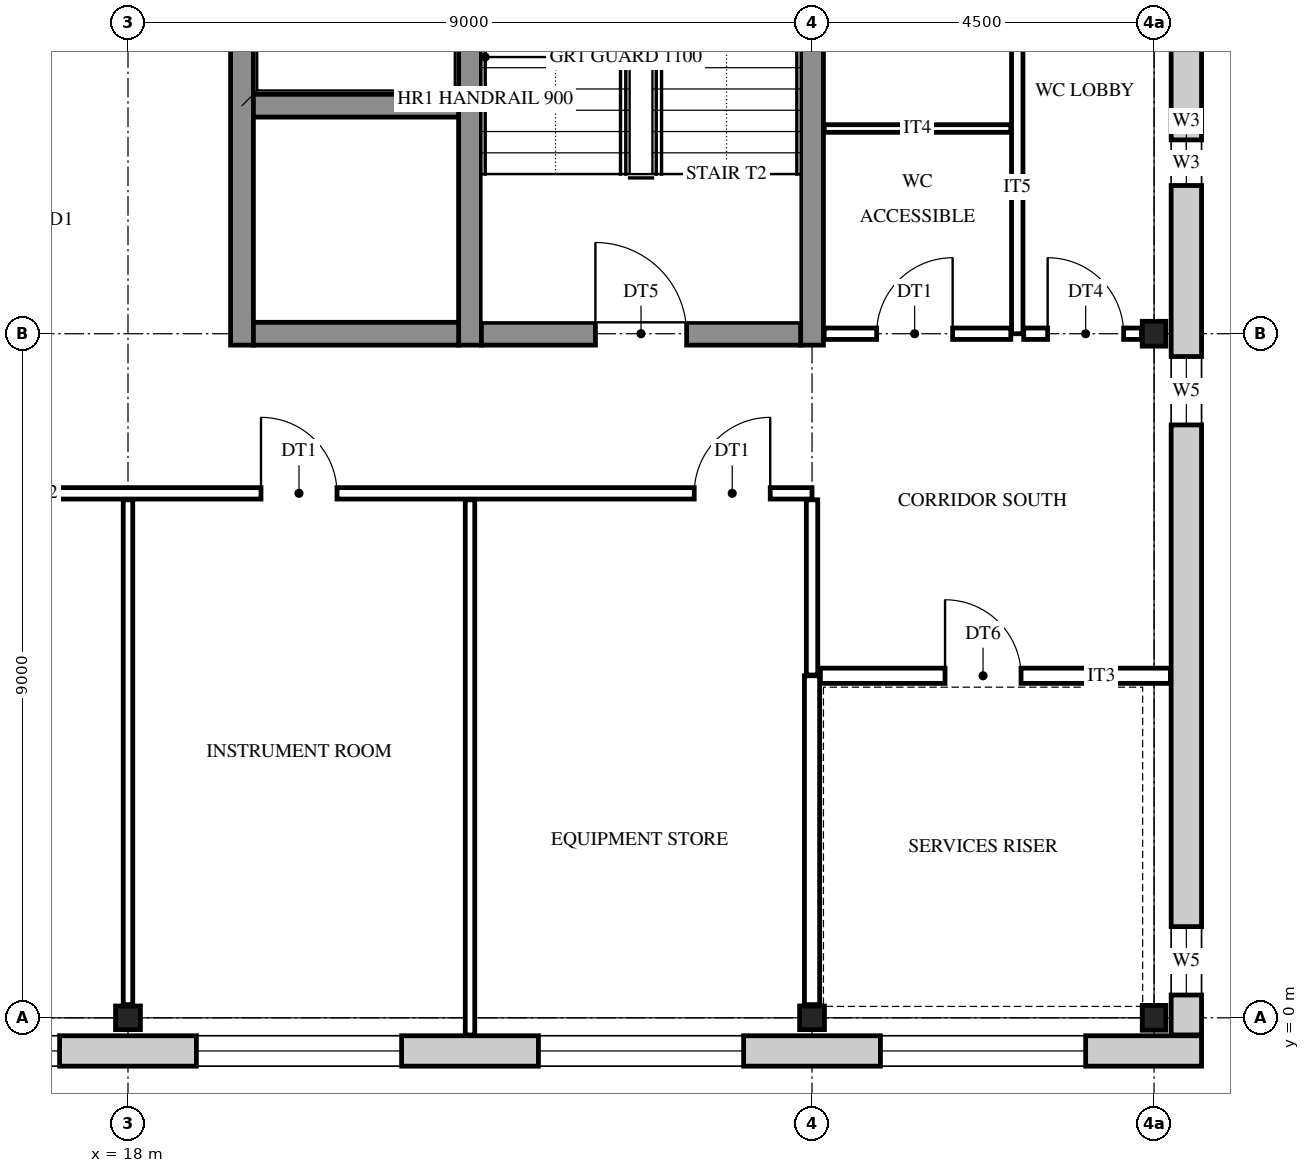
"""IFC4 building model, lengths in metres.
Left out: names, types, materials, properties, quantities, classifications, styles, units other than length and angle.
Written with IfcOpenShell. Run it as: python <this file> out.ifc"""

import sys

from ifc_helpers import new_model, si_unit, direction, frame, frame_2d, origin, origin_2d, place, context, subcontext, project, spatial, rectangle, i_section, extrude, element, fill, save


model = new_model("IFC4")
c1 = context("Model", 3, precision=1e-05, world=origin(), true_north=direction((0.0, 1.0)))
c2 = subcontext(c1, "Body", "Model", "MODEL_VIEW")
j1 = project(units=[si_unit("LENGTHUNIT", "METRE"), si_unit("PLANEANGLEUNIT", "RADIAN")], contexts=[c1])
p1 = place(None, origin())
s1 = spatial("IfcSite", under=j1, at=p1, CompositionType="ELEMENT")
p2 = place(p1, origin())
s2 = spatial("IfcBuilding", under=s1, at=p2, CompositionType="ELEMENT")
p3 = place(p2, frame((0.0, 0.0, 40.2)))
s3 = spatial("IfcBuildingStorey", under=s2, at=p3, CompositionType="ELEMENT", Elevation=40.2)
for number, where, z_axis, x_axis in (
    (1, (18.0, 0.0, 0.0), (0.0, 0.0, 1.0), (0.0, 1.0, 0.0)),
    (2, (27.0, 0.0, 0.0), (0.0, 0.0, 1.0), (0.0, 1.0, 0.0)),
    (3, (31.5, 0.0, 0.0), (0.0, 0.0, 1.0), (1.0, 0.0, 0.0)),
    (4, (31.5, 9.0, 0.0), (0.0, 0.0, 1.0), (1.0, 0.0, 0.0)),
):
    element("IfcColumn", number, at=place(p3, frame(where, z_axis=z_axis, x_axis=x_axis)), inside=s3, PredefinedType="COLUMN", context=c2, shape_type="SweptSolid", body=[
        extrude(i_section(OverallWidth=0.311, OverallDepth=0.327, WebThickness=0.016, FlangeThickness=0.025, FilletRadius=0.017, at=origin_2d()), origin(), (0.0, 0.0, 1.0), 4.2),
    ])
p4 = place(p3, frame((19.5, 8.85, 0.0), z_axis=(0.0, 0.0, 1.0), x_axis=(0.0, 1.0, 0.0)))
e5 = element("IfcWall", 5, at=p4, inside=s3, PredefinedType="SHEAR", context=c2, shape_type="SweptSolid", body=[
    extrude(rectangle(XDim=9.3, YDim=0.3, at=frame_2d((4.65, 0.0))), origin(), (0.0, 0.0, 1.0), 4.2),
])
p5 = place(p4, frame((3.95, 0.0, 0.0)))
e6 = element("IfcOpeningElement", 6, at=p5, cuts=e5, PredefinedType="OPENING", context=c2, shape_type="SweptSolid", body=[
    extrude(rectangle(XDim=1.4, YDim=2.1, at=frame_2d((0.7, 1.05))), frame((0.0, 0.16, 0.0), z_axis=(0.0, -1.0, 0.0), x_axis=(1.0, 0.0, 0.0)), (0.0, 0.0, 1.0), 0.32),
])
p6 = place(p4, frame((7.1, 0.0, 0.0)))
e7 = element("IfcOpeningElement", 7, at=p6, cuts=e5, PredefinedType="OPENING", context=c2, shape_type="SweptSolid", body=[
    extrude(rectangle(XDim=1.1, YDim=2.1, at=frame_2d((0.55, 1.05))), frame((0.0, 0.16, 0.0), z_axis=(0.0, -1.0, 0.0), x_axis=(1.0, 0.0, 0.0)), (0.0, 0.0, 1.0), 0.32),
])
for number, where, z_axis, x_axis in (
    (8, (22.5, 8.85, 0.0), (0.0, 0.0, 1.0), (0.0, 1.0, 0.0)),
    (9, (27.0, 8.85, 0.0), (0.0, 0.0, 1.0), (0.0, 1.0, 0.0)),
):
    element("IfcWall", number, at=place(p3, frame(where, z_axis=z_axis, x_axis=x_axis)), inside=s3, PredefinedType="SHEAR", context=c2, shape_type="SweptSolid", body=[
        extrude(rectangle(XDim=9.3, YDim=0.3, at=frame_2d((4.65, 0.0))), origin(), (0.0, 0.0, 1.0), 4.2),
    ])
p7 = place(p3, frame((19.65, 9.0, 0.0), z_axis=(0.0, 0.0, 1.0), x_axis=(1.0, 0.0, 0.0)))
e10 = element("IfcWall", 10, at=p7, inside=s3, PredefinedType="SHEAR", context=c2, shape_type="SweptSolid", body=[
    extrude(rectangle(XDim=2.7, YDim=0.3, at=frame_2d((1.35, 0.0))), origin(), (0.0, 0.0, 1.0), 4.2),
])
p8 = place(p3, frame((22.65, 9.0, 0.0), z_axis=(0.0, 0.0, 1.0), x_axis=(1.0, 0.0, 0.0)))
e11 = element("IfcWall", 11, at=p8, inside=s3, PredefinedType="SHEAR", context=c2, shape_type="SweptSolid", body=[
    extrude(rectangle(XDim=4.2, YDim=0.3, at=frame_2d((2.1, 0.0))), origin(), (0.0, 0.0, 1.0), 4.2),
])
p9 = place(p8, frame((1.5, 0.0, 0.0)))
e12 = element("IfcOpeningElement", 12, at=p9, cuts=e11, PredefinedType="OPENING", context=c2, shape_type="SweptSolid", body=[
    extrude(rectangle(XDim=1.2, YDim=2.1, at=frame_2d((0.6, 1.05))), frame((0.0, 0.16, 0.0), z_axis=(0.0, -1.0, 0.0), x_axis=(1.0, 0.0, 0.0)), (0.0, 0.0, 1.0), 0.32),
])
p10 = place(p3, frame((19.65, 12.0, 0.0), z_axis=(0.0, 0.0, 1.0), x_axis=(1.0, 0.0, 0.0)))
e13 = element("IfcWall", 13, at=p10, inside=s3, PredefinedType="SHEAR", context=c2, shape_type="SweptSolid", body=[
    extrude(rectangle(XDim=2.7, YDim=0.3, at=frame_2d((1.35, 0.0))), origin(), (0.0, 0.0, 1.0), 4.2),
])
p11 = place(p3, frame((32.125, -0.436, 0.0), z_axis=(0.0, 0.0, 1.0), x_axis=(-1.0, 0.0, 0.0)))
e14 = element("IfcWall", 14, at=p11, inside=s3, PredefinedType="STANDARD", context=c2, shape_type="SweptSolid", body=[
    extrude(rectangle(XDim=32.75, YDim=0.4, at=frame_2d((16.375, 0.0))), origin(), (0.0, 0.0, 1.0), 4.2),
])
p12 = place(p11, frame((28.525, 0.0, 0.9)))
e15 = element("IfcOpeningElement", 15, at=p12, cuts=e14, PredefinedType="OPENING", context=c2, shape_type="SweptSolid", body=[
    extrude(rectangle(XDim=2.7, YDim=2.5, at=frame_2d((1.35, 1.25))), frame((0.0, 0.21, 0.0), z_axis=(0.0, -1.0, 0.0), x_axis=(1.0, 0.0, 0.0)), (0.0, 0.0, 1.0), 0.42),
])
p13 = place(p11, frame((24.025, 0.0, 0.9)))
e16 = element("IfcOpeningElement", 16, at=p13, cuts=e14, PredefinedType="OPENING", context=c2, shape_type="SweptSolid", body=[
    extrude(rectangle(XDim=2.7, YDim=2.5, at=frame_2d((1.35, 1.25))), frame((0.0, 0.21, 0.0), z_axis=(0.0, -1.0, 0.0), x_axis=(1.0, 0.0, 0.0)), (0.0, 0.0, 1.0), 0.42),
])
p14 = place(p11, frame((19.525, 0.0, 0.9)))
e17 = element("IfcOpeningElement", 17, at=p14, cuts=e14, PredefinedType="OPENING", context=c2, shape_type="SweptSolid", body=[
    extrude(rectangle(XDim=2.7, YDim=2.5, at=frame_2d((1.35, 1.25))), frame((0.0, 0.21, 0.0), z_axis=(0.0, -1.0, 0.0), x_axis=(1.0, 0.0, 0.0)), (0.0, 0.0, 1.0), 0.42),
])
p15 = place(p11, frame((15.025, 0.0, 0.9)))
e18 = element("IfcOpeningElement", 18, at=p15, cuts=e14, PredefinedType="OPENING", context=c2, shape_type="SweptSolid", body=[
    extrude(rectangle(XDim=2.7, YDim=2.5, at=frame_2d((1.35, 1.25))), frame((0.0, 0.21, 0.0), z_axis=(0.0, -1.0, 0.0), x_axis=(1.0, 0.0, 0.0)), (0.0, 0.0, 1.0), 0.42),
])
p16 = place(p11, frame((10.525, 0.0, 0.9)))
e19 = element("IfcOpeningElement", 19, at=p16, cuts=e14, PredefinedType="OPENING", context=c2, shape_type="SweptSolid", body=[
    extrude(rectangle(XDim=2.7, YDim=2.5, at=frame_2d((1.35, 1.25))), frame((0.0, 0.21, 0.0), z_axis=(0.0, -1.0, 0.0), x_axis=(1.0, 0.0, 0.0)), (0.0, 0.0, 1.0), 0.42),
])
p17 = place(p11, frame((6.025, 0.0, 0.9)))
e20 = element("IfcOpeningElement", 20, at=p17, cuts=e14, PredefinedType="OPENING", context=c2, shape_type="SweptSolid", body=[
    extrude(rectangle(XDim=2.7, YDim=2.5, at=frame_2d((1.35, 1.25))), frame((0.0, 0.21, 0.0), z_axis=(0.0, -1.0, 0.0), x_axis=(1.0, 0.0, 0.0)), (0.0, 0.0, 1.0), 0.42),
])
p18 = place(p11, frame((1.525, 0.0, 0.9)))
e21 = element("IfcOpeningElement", 21, at=p18, cuts=e14, PredefinedType="OPENING", context=c2, shape_type="SweptSolid", body=[
    extrude(rectangle(XDim=2.7, YDim=2.5, at=frame_2d((1.35, 1.25))), frame((0.0, 0.21, 0.0), z_axis=(0.0, -1.0, 0.0), x_axis=(1.0, 0.0, 0.0)), (0.0, 0.0, 1.0), 0.42),
])
p19 = place(p3, frame((31.925, 27.225, 0.0), z_axis=(0.0, 0.0, 1.0), x_axis=(0.0, -1.0, 0.0)))
e22 = element("IfcWall", 22, at=p19, inside=s3, PredefinedType="STANDARD", context=c2, shape_type="SweptSolid", body=[
    extrude(rectangle(XDim=27.45, YDim=0.4, at=frame_2d((13.725, 0.0))), origin(), (0.0, 0.0, 1.0), 4.2),
])
p20 = place(p19, frame((26.025, 0.0, 0.9)))
e23 = element("IfcOpeningElement", 23, at=p20, cuts=e22, PredefinedType="OPENING", context=c2, shape_type="SweptSolid", body=[
    extrude(rectangle(XDim=0.9, YDim=2.0, at=frame_2d((0.45, 1.0))), frame((0.0, 0.21, 0.0), z_axis=(0.0, -1.0, 0.0), x_axis=(1.0, 0.0, 0.0)), (0.0, 0.0, 1.0), 0.42),
])
p21 = place(p19, frame((18.525, 0.0, 0.9)))
e24 = element("IfcOpeningElement", 24, at=p21, cuts=e22, PredefinedType="OPENING", context=c2, shape_type="SweptSolid", body=[
    extrude(rectangle(XDim=0.9, YDim=2.0, at=frame_2d((0.45, 1.0))), frame((0.0, 0.21, 0.0), z_axis=(0.0, -1.0, 0.0), x_axis=(1.0, 0.0, 0.0)), (0.0, 0.0, 1.0), 0.42),
])
p22 = place(p19, frame((15.675, 0.0, 1.6)))
e25 = element("IfcOpeningElement", 25, at=p22, cuts=e22, PredefinedType="OPENING", context=c2, shape_type="SweptSolid", body=[
    extrude(rectangle(XDim=0.6, YDim=0.9, at=frame_2d((0.3, 0.45))), frame((0.0, 0.21, 0.0), z_axis=(0.0, -1.0, 0.0), x_axis=(1.0, 0.0, 0.0)), (0.0, 0.0, 1.0), 0.42),
])
p23 = place(p19, frame((11.175, 0.0, 1.6)))
e26 = element("IfcOpeningElement", 26, at=p23, cuts=e22, PredefinedType="OPENING", context=c2, shape_type="SweptSolid", body=[
    extrude(rectangle(XDim=0.6, YDim=0.9, at=frame_2d((0.3, 0.45))), frame((0.0, 0.21, 0.0), z_axis=(0.0, -1.0, 0.0), x_axis=(1.0, 0.0, 0.0)), (0.0, 0.0, 1.0), 0.42),
])
p24 = place(p19, frame((8.025, 0.0, 0.9)))
e27 = element("IfcOpeningElement", 27, at=p24, cuts=e22, PredefinedType="OPENING", context=c2, shape_type="SweptSolid", body=[
    extrude(rectangle(XDim=0.9, YDim=2.0, at=frame_2d((0.45, 1.0))), frame((0.0, 0.21, 0.0), z_axis=(0.0, -1.0, 0.0), x_axis=(1.0, 0.0, 0.0)), (0.0, 0.0, 1.0), 0.42),
])
p25 = place(p19, frame((0.525, 0.0, 0.9)))
e28 = element("IfcOpeningElement", 28, at=p25, cuts=e22, PredefinedType="OPENING", context=c2, shape_type="SweptSolid", body=[
    extrude(rectangle(XDim=0.9, YDim=2.0, at=frame_2d((0.45, 1.0))), frame((0.0, 0.21, 0.0), z_axis=(0.0, -1.0, 0.0), x_axis=(1.0, 0.0, 0.0)), (0.0, 0.0, 1.0), 0.42),
])
p26 = place(p3, frame((18.0, 0.174, 0.0), z_axis=(0.0, 0.0, 1.0), x_axis=(0.0, 1.0, 0.0)))
e29 = element("IfcWall", 29, at=p26, inside=s3, PredefinedType="PARTITIONING", context=c2, shape_type="SweptSolid", body=[
    extrude(rectangle(XDim=6.641, YDim=0.125, at=frame_2d((3.321, 0.0))), origin(), (0.0, 0.0, 1.0), 3.537),
])
p27 = place(p3, frame((22.5, -0.226, 0.0), z_axis=(0.0, 0.0, 1.0), x_axis=(0.0, 1.0, 0.0)))
e30 = element("IfcWall", 30, at=p27, inside=s3, PredefinedType="PARTITIONING", context=c2, shape_type="SweptSolid", body=[
    extrude(rectangle(XDim=7.041, YDim=0.125, at=frame_2d((3.521, 0.0))), origin(), (0.0, 0.0, 1.0), 3.537),
])
p28 = place(p3, frame((27.0, 0.174, 0.0), z_axis=(0.0, 0.0, 1.0), x_axis=(0.0, 1.0, 0.0)))
e31 = element("IfcWall", 31, at=p28, inside=s3, PredefinedType="PARTITIONING", context=c2, shape_type="SweptSolid", body=[
    extrude(rectangle(XDim=4.326, YDim=0.2, at=frame_2d((2.163, 0.0))), origin(), (0.0, 0.0, 1.0), 3.537),
])
p29 = place(p3, frame((27.0, 4.51, 0.0), z_axis=(0.0, 0.0, 1.0), x_axis=(0.0, 1.0, 0.0)))
e32 = element("IfcWall", 32, at=p29, inside=s3, PredefinedType="PARTITIONING", context=c2, shape_type="SweptSolid", body=[
    extrude(rectangle(XDim=2.305, YDim=0.15, at=frame_2d((1.152, 0.0))), origin(), (0.0, 0.0, 1.0), 3.537),
])
p30 = place(p3, frame((29.7, 9.0, 0.0), z_axis=(0.0, 0.0, 1.0), x_axis=(0.0, 1.0, 0.0)))
e33 = element("IfcWall", 33, at=p30, inside=s3, PredefinedType="PARTITIONING", context=c2, shape_type="SweptSolid", body=[
    extrude(rectangle(XDim=6.3, YDim=0.15, at=frame_2d((3.15, 0.0))), origin(), (0.0, 0.0, 1.0), 3.537),
])
p31 = place(p30, frame((4.0, 0.0, 0.0)))
e34 = element("IfcOpeningElement", 34, at=p31, cuts=e33, PredefinedType="OPENING", context=c2, shape_type="SweptSolid", body=[
    extrude(rectangle(XDim=1.0, YDim=2.1, at=frame_2d((0.5, 1.05))), frame((0.0, 0.085, 0.0), z_axis=(0.0, -1.0, 0.0), x_axis=(1.0, 0.0, 0.0)), (0.0, 0.0, 1.0), 0.17),
])
p32 = place(p3, frame((27.11, 4.5, 0.0), z_axis=(0.0, 0.0, 1.0), x_axis=(1.0, 0.0, 0.0)))
e35 = element("IfcWall", 35, at=p32, inside=s3, PredefinedType="PARTITIONING", context=c2, shape_type="SweptSolid", body=[
    extrude(rectangle(XDim=4.605, YDim=0.2, at=frame_2d((2.302, 0.0))), origin(), (0.0, 0.0, 1.0), 3.537),
])
p33 = place(p32, frame((1.64, 0.0, 0.0)))
e36 = element("IfcOpeningElement", 36, at=p33, cuts=e35, PredefinedType="OPENING", context=c2, shape_type="SweptSolid", body=[
    extrude(rectangle(XDim=1.0, YDim=2.1, at=frame_2d((0.5, 1.05))), frame((0.0, 0.11, 0.0), z_axis=(0.0, -1.0, 0.0), x_axis=(1.0, 0.0, 0.0)), (0.0, 0.0, 1.0), 0.22),
])
p34 = place(p3, frame((6.9, 6.9, 0.0), z_axis=(0.0, 0.0, 1.0), x_axis=(1.0, 0.0, 0.0)))
e37 = element("IfcWall", 37, at=p34, inside=s3, PredefinedType="PARTITIONING", context=c2, shape_type="SweptSolid", body=[
    extrude(rectangle(XDim=20.1, YDim=0.15, at=frame_2d((10.05, 0.0))), origin(), (0.0, 0.0, 1.0), 3.537),
])
p35 = place(p34, frame((0.5, 0.0, 0.0)))
e38 = element("IfcOpeningElement", 38, at=p35, cuts=e37, PredefinedType="OPENING", context=c2, shape_type="SweptSolid", body=[
    extrude(rectangle(XDim=1.1, YDim=2.1, at=frame_2d((0.55, 1.05))), frame((0.0, 0.085, 0.0), z_axis=(0.0, -1.0, 0.0), x_axis=(1.0, 0.0, 0.0)), (0.0, 0.0, 1.0), 0.17),
])
p36 = place(p34, frame((6.05, 0.0, 0.0)))
e39 = element("IfcOpeningElement", 39, at=p36, cuts=e37, PredefinedType="OPENING", context=c2, shape_type="SweptSolid", body=[
    extrude(rectangle(XDim=1.1, YDim=2.1, at=frame_2d((0.55, 1.05))), frame((0.0, 0.085, 0.0), z_axis=(0.0, -1.0, 0.0), x_axis=(1.0, 0.0, 0.0)), (0.0, 0.0, 1.0), 0.17),
])
p37 = place(p34, frame((12.85, 0.0, 0.0)))
e40 = element("IfcOpeningElement", 40, at=p37, cuts=e37, PredefinedType="OPENING", context=c2, shape_type="SweptSolid", body=[
    extrude(rectangle(XDim=1.0, YDim=2.1, at=frame_2d((0.5, 1.05))), frame((0.0, 0.085, 0.0), z_axis=(0.0, -1.0, 0.0), x_axis=(1.0, 0.0, 0.0)), (0.0, 0.0, 1.0), 0.17),
])
p38 = place(p34, frame((18.55, 0.0, 0.0)))
e41 = element("IfcOpeningElement", 41, at=p38, cuts=e37, PredefinedType="OPENING", context=c2, shape_type="SweptSolid", body=[
    extrude(rectangle(XDim=1.0, YDim=2.1, at=frame_2d((0.5, 1.05))), frame((0.0, 0.085, 0.0), z_axis=(0.0, -1.0, 0.0), x_axis=(1.0, 0.0, 0.0)), (0.0, 0.0, 1.0), 0.17),
])
p39 = place(p3, frame((27.16, 9.0, 0.0), z_axis=(0.0, 0.0, 1.0), x_axis=(1.0, 0.0, 0.0)))
e42 = element("IfcWall", 42, at=p39, inside=s3, PredefinedType="PARTITIONING", context=c2, shape_type="SweptSolid", body=[
    extrude(rectangle(XDim=2.455, YDim=0.15, at=frame_2d((1.228, 0.0))), origin(), (0.0, 0.0, 1.0), 3.537),
])
p40 = place(p39, frame((0.69, 0.0, 0.0)))
e43 = element("IfcOpeningElement", 43, at=p40, cuts=e42, PredefinedType="OPENING", context=c2, shape_type="SweptSolid", body=[
    extrude(rectangle(XDim=1.0, YDim=2.1, at=frame_2d((0.5, 1.05))), frame((0.0, 0.085, 0.0), z_axis=(0.0, -1.0, 0.0), x_axis=(1.0, 0.0, 0.0)), (0.0, 0.0, 1.0), 0.17),
])
p41 = place(p3, frame((29.785, 9.0, 0.0), z_axis=(0.0, 0.0, 1.0), x_axis=(1.0, 0.0, 0.0)))
e44 = element("IfcWall", 44, at=p41, inside=s3, PredefinedType="PARTITIONING", context=c2, shape_type="SweptSolid", body=[
    extrude(rectangle(XDim=1.55, YDim=0.15, at=frame_2d((0.775, 0.0))), origin(), (0.0, 0.0, 1.0), 3.537),
])
p42 = place(p41, frame((0.315, 0.0, 0.0)))
e45 = element("IfcOpeningElement", 45, at=p42, cuts=e44, PredefinedType="OPENING", context=c2, shape_type="SweptSolid", body=[
    extrude(rectangle(XDim=1.0, YDim=2.1, at=frame_2d((0.5, 1.05))), frame((0.0, 0.085, 0.0), z_axis=(0.0, -1.0, 0.0), x_axis=(1.0, 0.0, 0.0)), (0.0, 0.0, 1.0), 0.17),
])
p43 = place(p3, frame((27.16, 11.7, 0.0), z_axis=(0.0, 0.0, 1.0), x_axis=(1.0, 0.0, 0.0)))
e46 = element("IfcWall", 46, at=p43, inside=s3, PredefinedType="PARTITIONING", context=c2, shape_type="SweptSolid", body=[
    extrude(rectangle(XDim=2.455, YDim=0.1, at=frame_2d((1.228, 0.0))), origin(), (0.0, 0.0, 1.0), 3.537),
])
p44 = place(p15, origin())
e47 = element("IfcWindow", 47, at=p44, inside=s3, PartitioningType="SINGLE_PANEL", PredefinedType="WINDOW", context=c2, shape_type="SweptSolid", body=[
    extrude(rectangle(XDim=2.7, YDim=2.5, at=frame_2d((1.35, 1.25))), frame((0.0, 0.03, 0.0), z_axis=(0.0, -1.0, 0.0), x_axis=(1.0, 0.0, 0.0)), (0.0, 0.0, 1.0), 0.06),
])
fill(e18, e47)
p45 = place(p16, origin())
e48 = element("IfcWindow", 48, at=p45, inside=s3, PartitioningType="SINGLE_PANEL", PredefinedType="WINDOW", context=c2, shape_type="SweptSolid", body=[
    extrude(rectangle(XDim=2.7, YDim=2.5, at=frame_2d((1.35, 1.25))), frame((0.0, 0.03, 0.0), z_axis=(0.0, -1.0, 0.0), x_axis=(1.0, 0.0, 0.0)), (0.0, 0.0, 1.0), 0.06),
])
fill(e19, e48)
p46 = place(p17, origin())
e49 = element("IfcWindow", 49, at=p46, inside=s3, PartitioningType="SINGLE_PANEL", PredefinedType="WINDOW", context=c2, shape_type="SweptSolid", body=[
    extrude(rectangle(XDim=2.7, YDim=2.5, at=frame_2d((1.35, 1.25))), frame((0.0, 0.03, 0.0), z_axis=(0.0, -1.0, 0.0), x_axis=(1.0, 0.0, 0.0)), (0.0, 0.0, 1.0), 0.06),
])
fill(e20, e49)
p47 = place(p18, origin())
e50 = element("IfcWindow", 50, at=p47, inside=s3, PartitioningType="SINGLE_PANEL", PredefinedType="WINDOW", context=c2, shape_type="SweptSolid", body=[
    extrude(rectangle(XDim=2.7, YDim=2.5, at=frame_2d((1.35, 1.25))), frame((0.0, 0.03, 0.0), z_axis=(0.0, -1.0, 0.0), x_axis=(1.0, 0.0, 0.0)), (0.0, 0.0, 1.0), 0.06),
])
fill(e21, e50)
p48 = place(p20, origin())
e51 = element("IfcWindow", 51, at=p48, inside=s3, PartitioningType="SINGLE_PANEL", PredefinedType="WINDOW", context=c2, shape_type="SweptSolid", body=[
    extrude(rectangle(XDim=0.9, YDim=2.0, at=frame_2d((0.45, 1.0))), frame((0.0, 0.03, 0.0), z_axis=(0.0, -1.0, 0.0), x_axis=(1.0, 0.0, 0.0)), (0.0, 0.0, 1.0), 0.06),
])
fill(e23, e51)
p49 = place(p21, origin())
e52 = element("IfcWindow", 52, at=p49, inside=s3, PartitioningType="SINGLE_PANEL", PredefinedType="WINDOW", context=c2, shape_type="SweptSolid", body=[
    extrude(rectangle(XDim=0.9, YDim=2.0, at=frame_2d((0.45, 1.0))), frame((0.0, 0.03, 0.0), z_axis=(0.0, -1.0, 0.0), x_axis=(1.0, 0.0, 0.0)), (0.0, 0.0, 1.0), 0.06),
])
fill(e24, e52)
p50 = place(p22, origin())
e53 = element("IfcWindow", 53, at=p50, inside=s3, PartitioningType="SINGLE_PANEL", PredefinedType="WINDOW", context=c2, shape_type="SweptSolid", body=[
    extrude(rectangle(XDim=0.6, YDim=0.9, at=frame_2d((0.3, 0.45))), frame((0.0, 0.03, 0.0), z_axis=(0.0, -1.0, 0.0), x_axis=(1.0, 0.0, 0.0)), (0.0, 0.0, 1.0), 0.06),
])
fill(e25, e53)
p51 = place(p9, origin())
e54 = element("IfcDoor", 54, at=p51, inside=s3, OperationType="SINGLE_SWING_LEFT", PredefinedType="DOOR", context=c2, shape_type="SweptSolid", body=[
    extrude(rectangle(XDim=1.2, YDim=2.1, at=frame_2d((0.6, 1.05))), frame((0.0, 0.025, 0.0), z_axis=(0.0, -1.0, 0.0), x_axis=(1.0, 0.0, 0.0)), (0.0, 0.0, 1.0), 0.05),
])
fill(e12, e54)
p52 = place(p40, origin())
e55 = element("IfcDoor", 55, at=p52, inside=s3, OperationType="SINGLE_SWING_RIGHT", PredefinedType="DOOR", context=c2, shape_type="SweptSolid", body=[
    extrude(rectangle(XDim=1.0, YDim=2.1, at=frame_2d((0.5, 1.05))), frame((0.0, 0.025, 0.0), z_axis=(0.0, -1.0, 0.0), x_axis=(1.0, 0.0, 0.0)), (0.0, 0.0, 1.0), 0.05),
])
fill(e43, e55)
p53 = place(p42, origin())
e56 = element("IfcDoor", 56, at=p53, inside=s3, OperationType="SINGLE_SWING_LEFT", PredefinedType="DOOR", context=c2, shape_type="SweptSolid", body=[
    extrude(rectangle(XDim=1.0, YDim=2.1, at=frame_2d((0.5, 1.05))), frame((0.0, 0.025, 0.0), z_axis=(0.0, -1.0, 0.0), x_axis=(1.0, 0.0, 0.0)), (0.0, 0.0, 1.0), 0.05),
])
fill(e45, e56)
p54 = place(p33, frame((1.0, 0.0, 0.0), z_axis=(0.0, 0.0, 1.0), x_axis=(-1.0, 0.0, 0.0)))
e57 = element("IfcDoor", 57, at=p54, inside=s3, OperationType="SINGLE_SWING_LEFT", PredefinedType="DOOR", context=c2, shape_type="SweptSolid", body=[
    extrude(rectangle(XDim=1.0, YDim=2.1, at=frame_2d((0.5, 1.05))), frame((0.0, 0.025, 0.0), z_axis=(0.0, -1.0, 0.0), x_axis=(1.0, 0.0, 0.0)), (0.0, 0.0, 1.0), 0.05),
])
fill(e36, e57)
p55 = place(p37, frame((1.0, 0.0, 0.0), z_axis=(0.0, 0.0, 1.0), x_axis=(-1.0, 0.0, 0.0)))
e58 = element("IfcDoor", 58, at=p55, inside=s3, OperationType="SINGLE_SWING_LEFT", PredefinedType="DOOR", context=c2, shape_type="SweptSolid", body=[
    extrude(rectangle(XDim=1.0, YDim=2.1, at=frame_2d((0.5, 1.05))), frame((0.0, 0.025, 0.0), z_axis=(0.0, -1.0, 0.0), x_axis=(1.0, 0.0, 0.0)), (0.0, 0.0, 1.0), 0.05),
])
fill(e40, e58)
p56 = place(p38, frame((1.0, 0.0, 0.0), z_axis=(0.0, 0.0, 1.0), x_axis=(-1.0, 0.0, 0.0)))
e59 = element("IfcDoor", 59, at=p56, inside=s3, OperationType="SINGLE_SWING_RIGHT", PredefinedType="DOOR", context=c2, shape_type="SweptSolid", body=[
    extrude(rectangle(XDim=1.0, YDim=2.1, at=frame_2d((0.5, 1.05))), frame((0.0, 0.025, 0.0), z_axis=(0.0, -1.0, 0.0), x_axis=(1.0, 0.0, 0.0)), (0.0, 0.0, 1.0), 0.05),
])
fill(e41, e59)
save(model, sys.argv[1])
